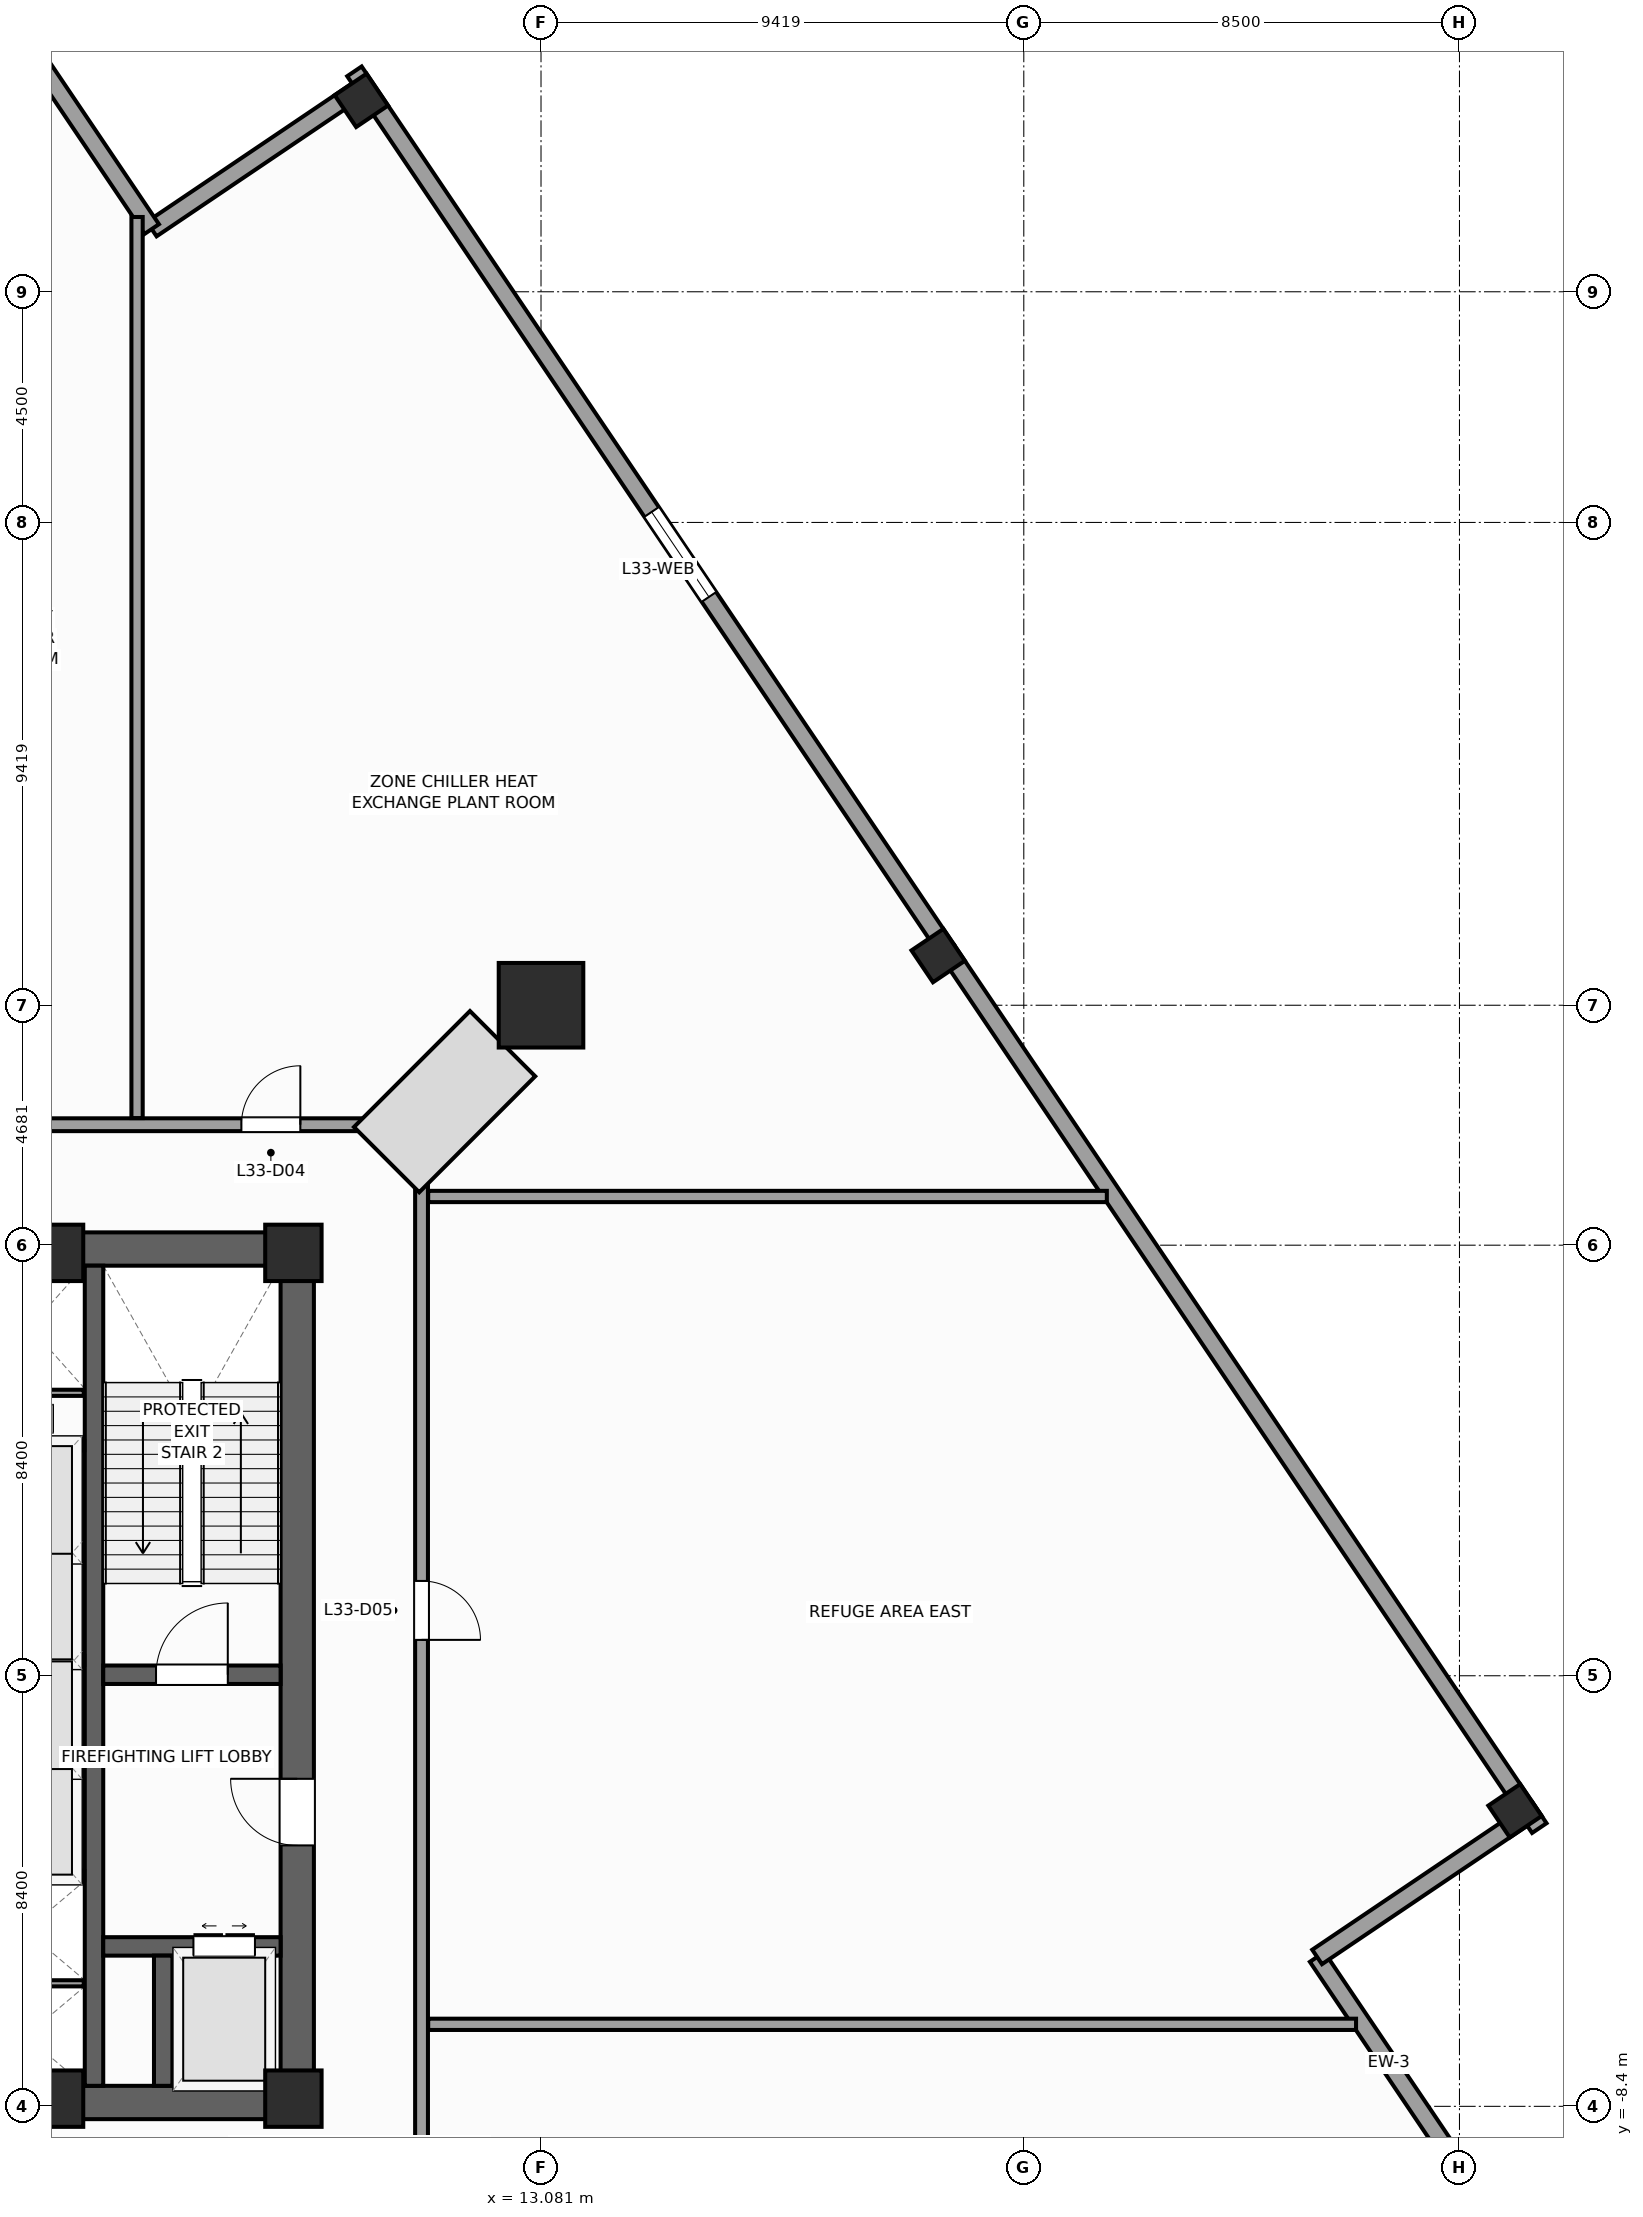
"""IFC4 building model, lengths in metres.
Left out: names, types, materials, properties, quantities, classifications, styles, units other than length and angle.
Written with IfcOpenShell. Run it as: python <this file> out.ifc"""

import sys

from ifc_helpers import new_model, si_unit, direction, frame, frame_2d, origin, origin_2d, place, context, subcontext, project, spatial, rectangle, extrude, source, transform, mapped, element, fill, save


model = new_model("IFC4")
c1 = context("Model", 3, precision=1e-05, world=origin(), true_north=direction((0.0, 1.0)))
c2 = subcontext(c1, "Body", "Model", "MODEL_VIEW")
j1 = project(units=[si_unit("LENGTHUNIT", "METRE"), si_unit("PLANEANGLEUNIT", "RADIAN")], contexts=[c1])
p1 = place(None, origin())
s1 = spatial("IfcSite", under=j1, at=p1, CompositionType="ELEMENT")
p2 = place(p1, origin())
s2 = spatial("IfcBuilding", under=s1, at=p2, CompositionType="ELEMENT")
p3 = place(p2, frame((0.0, 0.0, 139.2)))
s3 = spatial("IfcBuildingStorey", under=s2, at=p3, CompositionType="ELEMENT", Elevation=139.2)
p4 = place(p3, frame((-8.65, -8.325, 0.0), z_axis=(0.0, 0.0, 1.0), x_axis=(1.0, 0.0, 0.0)))
e1 = element("IfcWall", 1, at=p4, inside=s3, PredefinedType="SHEAR", context=c2, shape_type="SweptSolid", body=[
    extrude(rectangle(XDim=17.3, YDim=0.65, at=frame_2d((8.65, 0.0))), origin(), (0.0, 0.0, 1.0), 5.2),
])
p5 = place(p4, frame((8.0, 0.0, 0.0)))
e2 = element("IfcOpeningElement", 2, at=p5, cuts=e1, PredefinedType="OPENING", context=c2, shape_type="SweptSolid", body=[
    extrude(rectangle(XDim=1.3, YDim=2.2, at=frame_2d((0.65, 1.1))), frame((0.0, 0.335, 0.0), z_axis=(0.0, -1.0, 0.0), x_axis=(1.0, 0.0, 0.0)), (0.0, 0.0, 1.0), 0.67),
])
p6 = place(p3, frame((-8.65, 8.325, 0.0), z_axis=(0.0, 0.0, 1.0), x_axis=(1.0, 0.0, 0.0)))
e3 = element("IfcWall", 3, at=p6, inside=s3, PredefinedType="SHEAR", context=c2, shape_type="SweptSolid", body=[
    extrude(rectangle(XDim=17.3, YDim=0.65, at=frame_2d((8.65, 0.0))), origin(), (0.0, 0.0, 1.0), 5.2),
])
p7 = place(p3, frame((8.325, -8.0, 0.0), z_axis=(0.0, 0.0, 1.0), x_axis=(0.0, 1.0, 0.0)))
e4 = element("IfcWall", 4, at=p7, inside=s3, PredefinedType="SHEAR", context=c2, shape_type="SweptSolid", body=[
    extrude(rectangle(XDim=16.0, YDim=0.65, at=frame_2d((8.0, 0.0))), origin(), (0.0, 0.0, 1.0), 5.2),
])
p8 = place(p7, frame((4.69, 0.0, 0.0)))
e5 = element("IfcOpeningElement", 5, at=p8, cuts=e4, PredefinedType="OPENING", context=c2, shape_type="SweptSolid", body=[
    extrude(rectangle(XDim=1.3, YDim=2.2, at=frame_2d((0.65, 1.1))), frame((0.0, 0.335, 0.0), z_axis=(0.0, -1.0, 0.0), x_axis=(1.0, 0.0, 0.0)), (0.0, 0.0, 1.0), 0.67),
])
p9 = place(p3, frame((4.36, -8.0, 0.0), z_axis=(0.0, 0.0, 1.0), x_axis=(0.0, 1.0, 0.0)))
e6 = element("IfcWall", 6, at=p9, inside=s3, PredefinedType="SHEAR", context=c2, shape_type="SweptSolid", body=[
    extrude(rectangle(XDim=16.0, YDim=0.36, at=frame_2d((8.0, 0.0))), origin(), (0.0, 0.0, 1.0), 5.2),
])
p10 = place(p3, frame((4.54, 0.02, 0.0), z_axis=(0.0, 0.0, 1.0), x_axis=(1.0, 0.0, 0.0)))
e7 = element("IfcWall", 7, at=p10, inside=s3, PredefinedType="SHEAR", context=c2, shape_type="SweptSolid", body=[
    extrude(rectangle(XDim=3.46, YDim=0.36, at=frame_2d((1.73, 0.0))), origin(), (0.0, 0.0, 1.0), 5.2),
])
p11 = place(p10, frame((1.03, 0.0, 0.0)))
e8 = element("IfcOpeningElement", 8, at=p11, cuts=e7, PredefinedType="OPENING", context=c2, shape_type="SweptSolid", body=[
    extrude(rectangle(XDim=1.4, YDim=2.2, at=frame_2d((0.7, 1.1))), frame((0.0, 0.19, 0.0), z_axis=(0.0, -1.0, 0.0), x_axis=(1.0, 0.0, 0.0)), (0.0, 0.0, 1.0), 0.38),
])
p12 = place(p3, frame((4.54, -5.28, 0.0), z_axis=(0.0, 0.0, 1.0), x_axis=(1.0, 0.0, 0.0)))
e9 = element("IfcWall", 9, at=p12, inside=s3, PredefinedType="SHEAR", context=c2, shape_type="SweptSolid", body=[
    extrude(rectangle(XDim=3.46, YDim=0.36, at=frame_2d((1.73, 0.0))), origin(), (0.0, 0.0, 1.0), 5.2),
])
p13 = place(p12, frame((1.76, 0.0, 0.0)))
e10 = element("IfcOpeningElement", 10, at=p13, cuts=e9, PredefinedType="OPENING", context=c2, shape_type="SweptSolid", body=[
    extrude(rectangle(XDim=1.2, YDim=2.25, at=frame_2d((0.6, 1.125))), frame((0.0, 0.19, 0.0), z_axis=(0.0, -1.0, 0.0), x_axis=(1.0, 0.0, 0.0)), (0.0, 0.0, 1.0), 0.38),
])
p14 = place(p3, frame((5.71, -8.0, 0.0), z_axis=(0.0, 0.0, 1.0), x_axis=(0.0, 1.0, 0.0)))
e11 = element("IfcWall", 11, at=p14, inside=s3, PredefinedType="SHEAR", context=c2, shape_type="SweptSolid", body=[
    extrude(rectangle(XDim=2.54, YDim=0.36, at=frame_2d((1.27, 0.0))), origin(), (0.0, 0.0, 1.0), 5.2),
])
m1 = source(origin(), c2, "Body", "SweptSolid", [
    extrude(rectangle(XDim=1.1, YDim=1.1, at=origin_2d()), origin(), (0.0, 0.0, 1.0), 5.2),
])
for number, where, z_axis, x_axis in (
    (12, (8.25, -8.25, 0.0), (0.0, 0.0, 1.0), (1.0, 0.0, 0.0)),
    (13, (8.25, 8.25, 0.0), (0.0, 0.0, 1.0), (1.0, 0.0, 0.0)),
    (14, (3.6, -8.25, 0.0), (0.0, 0.0, 1.0), (1.0, 0.0, 0.0)),
    (15, (3.6, 8.25, 0.0), (0.0, 0.0, 1.0), (1.0, 0.0, 0.0)),
):
    element("IfcColumn", number, at=place(p3, frame(where, z_axis=z_axis, x_axis=x_axis)), inside=s3, PredefinedType="PILASTER", context=c2, shape_type="MappedRepresentation", body=[
        mapped(m1, transform((0.0, 0.0, 0.0), scale=1.0)),
    ])
m2 = source(origin(), c2, "Body", "SweptSolid", [
    extrude(rectangle(XDim=1.65, YDim=1.65, at=origin_2d()), origin(), (0.0, 0.0, 1.0), 5.2),
])
p15 = place(p3, frame((13.081, 13.081, 0.0), z_axis=(0.0, 0.0, 1.0), x_axis=(1.0, 0.0, 0.0)))
e16 = element("IfcColumn", 16, at=p15, inside=s3, PredefinedType="COLUMN", context=c2, shape_type="MappedRepresentation", body=[
    mapped(m2, transform((0.0, 0.0, 0.0), scale=1.0)),
])
m3 = source(origin(), c2, "Body", "SweptSolid", [
    extrude(rectangle(XDim=0.75, YDim=0.75, at=origin_2d()), origin(), (0.0, 0.0, 1.0), 5.2),
])
for number, where, z_axis, x_axis in (
    (17, (32.083, -2.635, 0.0), (0.0, 0.0, 1.0), (0.829, 0.559, 0.0)),
    (18, (20.83, 14.05, 0.0), (0.0, 0.0, 1.0), (0.829, 0.559, 0.0)),
    (19, (9.576, 30.734, 0.0), (0.0, 0.0, 1.0), (0.829, 0.559, 0.0)),
):
    element("IfcColumn", number, at=place(p3, frame(where, z_axis=z_axis, x_axis=x_axis)), inside=s3, PredefinedType="COLUMN", context=c2, shape_type="MappedRepresentation", body=[
        mapped(m3, transform((0.0, 0.0, 0.0), scale=1.0)),
    ])
p16 = place(p3, frame((31.019, -9.631, 0.0), z_axis=(0.0, 0.0, 1.0), x_axis=(-0.559210350234, 0.829025804298, 0.0)))
e20 = element("IfcWall", 20, at=p16, inside=s3, PredefinedType="STANDARD", context=c2, shape_type="SweptSolid", body=[
    extrude(rectangle(XDim=5.0, YDim=0.34, at=frame_2d((2.5, 0.0))), origin(), (0.0, 0.0, 1.0), 4.94),
])
p17 = place(p3, frame((28.223, -5.486, 0.0), z_axis=(0.0, 0.0, 1.0), x_axis=(0.82905227345, 0.559171107879, 0.0)))
e21 = element("IfcWall", 21, at=p17, inside=s3, PredefinedType="STANDARD", context=c2, shape_type="SweptSolid", body=[
    extrude(rectangle(XDim=5.17, YDim=0.34, at=frame_2d((2.585, 0.0))), origin(), (0.0, 0.0, 1.0), 4.24),
])
p18 = place(p3, frame((9.631, 31.019, 0.0), z_axis=(0.0, 0.0, 1.0), x_axis=(-0.829025804298, -0.559210350234, 0.0)))
e22 = element("IfcWall", 22, at=p18, inside=s3, PredefinedType="STANDARD", context=c2, shape_type="SweptSolid", body=[
    extrude(rectangle(XDim=5.0, YDim=0.34, at=frame_2d((2.5, 0.0))), origin(), (0.0, 0.0, 1.0), 4.94),
])
p19 = place(p3, frame((5.486, 28.223, 0.0), z_axis=(0.0, 0.0, 1.0), x_axis=(-0.559171107879, 0.82905227345, 0.0)))
e23 = element("IfcWall", 23, at=p19, inside=s3, PredefinedType="STANDARD", context=c2, shape_type="SweptSolid", body=[
    extrude(rectangle(XDim=5.17, YDim=0.34, at=frame_2d((2.585, 0.0))), origin(), (0.0, 0.0, 1.0), 4.24),
])
p20 = place(p3, frame((32.558, -2.972, 0.0), z_axis=(0.0, 0.0, 1.0), x_axis=(-0.559194910251, 0.829036218961, 0.0)))
e24 = element("IfcWall", 24, at=p20, inside=s3, PredefinedType="STANDARD", context=c2, shape_type="SweptSolid", body=[
    extrude(rectangle(XDim=20.67, YDim=0.34, at=frame_2d((10.335, 0.0))), origin(), (0.0, 0.0, 1.0), 4.34),
])
p21 = place(p3, frame((21.0, 14.164, 0.0), z_axis=(0.0, 0.0, 1.0), x_axis=(-0.559194910251, 0.829036218961, 0.0)))
e25 = element("IfcWall", 25, at=p21, inside=s3, PredefinedType="STANDARD", context=c2, shape_type="SweptSolid", body=[
    extrude(rectangle(XDim=20.67, YDim=0.34, at=frame_2d((10.335, 0.0))), origin(), (0.0, 0.0, 1.0), 4.24),
])
p22 = place(p21, frame((8.302, 0.0, 0.65)))
e26 = element("IfcOpeningElement", 26, at=p22, cuts=e25, PredefinedType="OPENING", context=c2, shape_type="SweptSolid", body=[
    extrude(rectangle(XDim=2.0, YDim=1.45, at=frame_2d((1.0, 0.725))), frame((0.0, 0.18, 0.0), z_axis=(0.0, -1.0, 0.0), x_axis=(1.0, 0.0, 0.0)), (0.0, 0.0, 1.0), 0.36),
])
for number, where, z_axis, x_axis in (
    (27, (1.89, -3.9, 0.0), (0.0, 0.0, 1.0), (1.0, 0.0, 0.0)),
    (28, (1.89, 0.3, 0.0), (0.0, 0.0, 1.0), (1.0, 0.0, 0.0)),
    (29, (1.89, 4.49, 0.0), (0.0, 0.0, 1.0), (1.0, 0.0, 0.0)),
):
    element("IfcWall", number, at=place(p3, frame(where, z_axis=z_axis, x_axis=x_axis)), inside=s3, PredefinedType="PARTITIONING", context=c2, shape_type="SweptSolid", body=[
        extrude(rectangle(XDim=2.28, YDim=0.18, at=frame_2d((1.14, 0.0))), origin(), (0.0, 0.0, 1.0), 4.94),
    ])
for number, where, z_axis, x_axis in (
    (30, (1.9, -6.0, 0.0), (0.0, 0.0, 1.0), (1.0, 0.0, 0.0)),
    (31, (1.9, -1.8, 0.0), (0.0, 0.0, 1.0), (1.0, 0.0, 0.0)),
    (32, (1.9, 2.4, 0.0), (0.0, 0.0, 1.0), (1.0, 0.0, 0.0)),
):
    element("IfcWall", number, at=place(p3, frame(where, z_axis=z_axis, x_axis=x_axis)), inside=s3, PredefinedType="PARTITIONING", context=c2, shape_type="SweptSolid", body=[
        extrude(rectangle(XDim=2.26, YDim=0.12, at=frame_2d((1.13, 0.0))), origin(), (0.0, 0.0, 1.0), 4.94),
    ])
p23 = place(p3, frame((2.06, 5.52, 0.0), z_axis=(0.0, 0.0, 1.0), x_axis=(1.0, 0.0, 0.0)))
e33 = element("IfcWall", 33, at=p23, inside=s3, PredefinedType="PARTITIONING", context=c2, shape_type="SweptSolid", body=[
    extrude(rectangle(XDim=2.1, YDim=0.12, at=frame_2d((1.05, 0.0))), origin(), (0.0, 0.0, 1.0), 4.94),
])
p24 = place(p3, frame((-10.75, 10.75, 0.0), z_axis=(0.0, 0.0, 1.0), x_axis=(1.0, 0.0, 0.0)))
e34 = element("IfcWall", 34, at=p24, inside=s3, PredefinedType="PARTITIONING", context=c2, shape_type="SweptSolid", body=[
    extrude(rectangle(XDim=21.5, YDim=0.25, at=frame_2d((10.75, 0.0))), origin(), (0.0, 0.0, 1.0), 4.94),
])
p25 = place(p24, frame((2.365, 0.0, 0.0)))
e35 = element("IfcOpeningElement", 35, at=p25, cuts=e34, PredefinedType="OPENING", context=c2, shape_type="SweptSolid", body=[
    extrude(rectangle(XDim=1.15, YDim=2.25, at=frame_2d((0.575, 1.125))), frame((0.0, 0.135, 0.0), z_axis=(0.0, -1.0, 0.0), x_axis=(1.0, 0.0, 0.0)), (0.0, 0.0, 1.0), 0.27),
])
p26 = place(p24, frame((7.575, 0.0, 0.0)))
e36 = element("IfcOpeningElement", 36, at=p26, cuts=e34, PredefinedType="OPENING", context=c2, shape_type="SweptSolid", body=[
    extrude(rectangle(XDim=1.15, YDim=2.25, at=frame_2d((0.575, 1.125))), frame((0.0, 0.135, 0.0), z_axis=(0.0, -1.0, 0.0), x_axis=(1.0, 0.0, 0.0)), (0.0, 0.0, 1.0), 0.27),
])
p27 = place(p24, frame((12.775, 0.0, 0.0)))
e37 = element("IfcOpeningElement", 37, at=p27, cuts=e34, PredefinedType="OPENING", context=c2, shape_type="SweptSolid", body=[
    extrude(rectangle(XDim=1.15, YDim=2.25, at=frame_2d((0.575, 1.125))), frame((0.0, 0.135, 0.0), z_axis=(0.0, -1.0, 0.0), x_axis=(1.0, 0.0, 0.0)), (0.0, 0.0, 1.0), 0.27),
])
p28 = place(p24, frame((17.986, 0.0, 0.0)))
e38 = element("IfcOpeningElement", 38, at=p28, cuts=e34, PredefinedType="OPENING", context=c2, shape_type="SweptSolid", body=[
    extrude(rectangle(XDim=1.15, YDim=2.25, at=frame_2d((0.575, 1.125))), frame((0.0, 0.135, 0.0), z_axis=(0.0, -1.0, 0.0), x_axis=(1.0, 0.0, 0.0)), (0.0, 0.0, 1.0), 0.27),
])
p29 = place(p3, frame((10.75, -10.65, 0.0), z_axis=(0.0, 0.0, 1.0), x_axis=(0.0, 1.0, 0.0)))
e39 = element("IfcWall", 39, at=p29, inside=s3, PredefinedType="PARTITIONING", context=c2, shape_type="SweptSolid", body=[
    extrude(rectangle(XDim=21.3, YDim=0.25, at=frame_2d((10.65, 0.0))), origin(), (0.0, 0.0, 1.0), 4.94),
])
p30 = place(p29, frame((11.35, 0.0, 0.0)))
e40 = element("IfcOpeningElement", 40, at=p30, cuts=e39, PredefinedType="OPENING", context=c2, shape_type="SweptSolid", body=[
    extrude(rectangle(XDim=1.15, YDim=2.25, at=frame_2d((0.575, 1.125))), frame((0.0, 0.135, 0.0), z_axis=(0.0, -1.0, 0.0), x_axis=(1.0, 0.0, 0.0)), (0.0, 0.0, 1.0), 0.27),
])
p31 = place(p3, frame((5.2, 10.88, 0.0), z_axis=(0.0, 0.0, 1.0), x_axis=(0.0, 1.0, 0.0)))
e41 = element("IfcWall", 41, at=p31, inside=s3, PredefinedType="PARTITIONING", context=c2, shape_type="SweptSolid", body=[
    extrude(rectangle(XDim=17.579, YDim=0.22, at=frame_2d((8.79, 0.0))), origin(), (0.0, 0.0, 1.0), 4.94),
])
p32 = place(p3, frame((10.88, 9.35, 0.0), z_axis=(0.0, 0.0, 1.0), x_axis=(1.0, 0.0, 0.0)))
e42 = element("IfcWall", 42, at=p32, inside=s3, PredefinedType="PARTITIONING", context=c2, shape_type="SweptSolid", body=[
    extrude(rectangle(XDim=13.24, YDim=0.22, at=frame_2d((6.62, 0.0))), origin(), (0.0, 0.0, 1.0), 4.94),
])
p33 = place(p3, frame((10.88, -6.8, 0.0), z_axis=(0.0, 0.0, 1.0), x_axis=(1.0, 0.0, 0.0)))
e43 = element("IfcWall", 43, at=p33, inside=s3, PredefinedType="PARTITIONING", context=c2, shape_type="SweptSolid", body=[
    extrude(rectangle(XDim=18.103, YDim=0.22, at=frame_2d((9.051, 0.0))), origin(), (0.0, 0.0, 1.0), 4.94),
])
m4 = source(origin(), c2, "Body", "SweptSolid", [
    extrude(rectangle(XDim=2.0, YDim=1.45, at=frame_2d((1.0, 0.725))), frame((0.0, 0.03, 0.0), z_axis=(0.0, -1.0, 0.0), x_axis=(1.0, 0.0, 0.0)), (0.0, 0.0, 1.0), 0.06),
])
p34 = place(p22, origin())
e44 = element("IfcWindow", 44, at=p34, inside=s3, PartitioningType="SINGLE_PANEL", PredefinedType="WINDOW", context=c2, shape_type="MappedRepresentation", body=[
    mapped(m4, transform((0.0, 0.0, 0.0), scale=1.0)),
])
fill(e26, e44)
m5 = source(origin(), c2, "Body", "SweptSolid", [
    extrude(rectangle(XDim=1.4, YDim=2.2, at=frame_2d((0.7, 1.1))), frame((0.0, 0.025, 0.0), z_axis=(0.0, -1.0, 0.0), x_axis=(1.0, 0.0, 0.0)), (0.0, 0.0, 1.0), 0.05),
])
p35 = place(p11, origin())
e45 = element("IfcDoor", 45, at=p35, inside=s3, OperationType="SINGLE_SWING_RIGHT", PredefinedType="DOOR", context=c2, shape_type="MappedRepresentation", body=[
    mapped(m5, transform((0.0, 0.0, 0.0), scale=1.0)),
])
fill(e8, e45)
m6 = source(origin(), c2, "Body", "SweptSolid", [
    extrude(rectangle(XDim=1.3, YDim=2.2, at=frame_2d((0.65, 1.1))), frame((0.0, 0.025, 0.0), z_axis=(0.0, -1.0, 0.0), x_axis=(1.0, 0.0, 0.0)), (0.0, 0.0, 1.0), 0.05),
])
p36 = place(p8, origin())
e46 = element("IfcDoor", 46, at=p36, inside=s3, OperationType="SINGLE_SWING_RIGHT", PredefinedType="DOOR", context=c2, shape_type="MappedRepresentation", body=[
    mapped(m6, transform((0.0, 0.0, 0.0), scale=1.0)),
])
fill(e5, e46)
m7 = source(origin(), c2, "Body", "SweptSolid", [
    extrude(rectangle(XDim=1.2, YDim=2.25, at=frame_2d((0.6, 1.125))), frame((0.0, 0.025, 0.0), z_axis=(0.0, -1.0, 0.0), x_axis=(1.0, 0.0, 0.0)), (0.0, 0.0, 1.0), 0.05),
])
p37 = place(p13, origin())
e47 = element("IfcDoor", 47, at=p37, inside=s3, OperationType="DOUBLE_DOOR_SLIDING", PredefinedType="DOOR", context=c2, shape_type="MappedRepresentation", body=[
    mapped(m7, transform((0.0, 0.0, 0.0), scale=1.0)),
])
fill(e10, e47)
m8 = source(origin(), c2, "Body", "SweptSolid", [
    extrude(rectangle(XDim=1.15, YDim=2.25, at=frame_2d((0.575, 1.125))), frame((0.0, 0.025, 0.0), z_axis=(0.0, -1.0, 0.0), x_axis=(1.0, 0.0, 0.0)), (0.0, 0.0, 1.0), 0.05),
])
p38 = place(p28, origin())
e48 = element("IfcDoor", 48, at=p38, inside=s3, OperationType="SINGLE_SWING_RIGHT", PredefinedType="DOOR", context=c2, shape_type="MappedRepresentation", body=[
    mapped(m8, transform((0.0, 0.0, 0.0), scale=1.0)),
])
fill(e38, e48)
p39 = place(p30, frame((1.15, 0.0, 0.0), z_axis=(0.0, 0.0, 1.0), x_axis=(-1.0, 0.0, 0.0)))
e49 = element("IfcDoor", 49, at=p39, inside=s3, OperationType="SINGLE_SWING_LEFT", PredefinedType="DOOR", context=c2, shape_type="MappedRepresentation", body=[
    mapped(m8, transform((0.0, 0.0, 0.0), scale=1.0)),
])
fill(e40, e49)
save(model, sys.argv[1])
